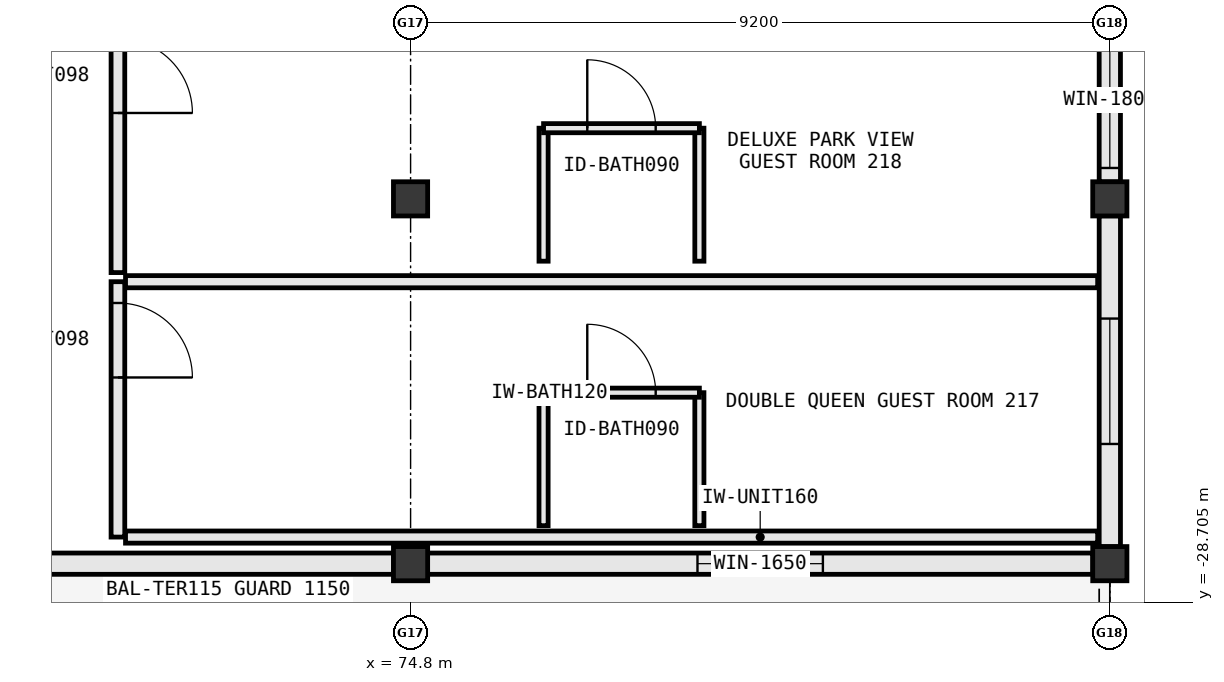
"""IFC4 building model, lengths in metres.
Left out: names, types, materials, properties, quantities, classifications, styles, units other than length and angle.
Written with IfcOpenShell. Run it as: python <this file> out.ifc"""

import sys

from ifc_helpers import new_model, si_unit, direction, frame, frame_2d, origin, origin_2d, place, context, subcontext, project, spatial, rectangle, extrude, element, fill, save


model = new_model("IFC4")
c1 = context("Model", 3, precision=1e-05, world=origin(), true_north=direction((0.0, 1.0)))
c2 = subcontext(c1, "Body", "Model", "MODEL_VIEW")
j1 = project(units=[si_unit("LENGTHUNIT", "METRE"), si_unit("PLANEANGLEUNIT", "RADIAN")], contexts=[c1])
p1 = place(None, origin())
s1 = spatial("IfcSite", under=j1, at=p1, CompositionType="ELEMENT")
p2 = place(p1, origin())
s2 = spatial("IfcBuilding", under=s1, at=p2, CompositionType="ELEMENT")
p3 = place(p2, frame((0.0, 0.0, 31.4)))
s3 = spatial("IfcBuildingStorey", under=s2, at=p3, CompositionType="ELEMENT", Elevation=31.4)
for number, where, z_axis, x_axis in (
    (1, (74.8, -28.2, 0.0), (0.0, 0.0, 1.0), (1.0, 0.0, 0.0)),
    (2, (74.8, -23.4, 0.0), (0.0, 0.0, 1.0), (1.0, 0.0, 0.0)),
    (3, (84.0, -28.2, 0.0), (0.0, 0.0, 1.0), (1.0, 0.0, 0.0)),
    (4, (84.0, -23.4, 0.0), (0.0, 0.0, 1.0), (1.0, 0.0, 0.0)),
):
    element("IfcColumn", number, at=place(p3, frame(where, z_axis=z_axis, x_axis=x_axis)), inside=s3, PredefinedType="COLUMN", context=c2, shape_type="SweptSolid", body=[
        extrude(rectangle(XDim=0.45, YDim=0.45, at=origin_2d()), origin(), (0.0, 0.0, 1.0), 3.8),
    ])
p4 = place(p3, frame((65.6, -28.2, 0.0), z_axis=(0.0, 0.0, 1.0), x_axis=(1.0, 0.0, 0.0)))
e5 = element("IfcWall", 5, at=p4, inside=s3, PredefinedType="STANDARD", context=c2, shape_type="SweptSolid", body=[
    extrude(rectangle(XDim=8.977, YDim=0.28, at=frame_2d((4.488, 0.0))), origin(), (0.0, 0.0, 1.0), 3.555),
])
p5 = place(p4, frame((2.6, 0.0, 0.0)))
e6 = element("IfcOpeningElement", 6, at=p5, cuts=e5, PredefinedType="OPENING", context=c2, shape_type="SweptSolid", body=[
    extrude(rectangle(XDim=1.5, YDim=2.22, at=frame_2d((0.75, 1.11))), frame((0.0, 0.152, 0.0), z_axis=(0.0, -1.0, 0.0), x_axis=(1.0, 0.0, 0.0)), (0.0, 0.0, 1.0), 0.304),
])
p6 = place(p3, frame((75.023, -28.2, 0.0), z_axis=(0.0, 0.0, 1.0), x_axis=(1.0, 0.0, 0.0)))
e7 = element("IfcWall", 7, at=p6, inside=s3, PredefinedType="STANDARD", context=c2, shape_type="SweptSolid", body=[
    extrude(rectangle(XDim=8.754, YDim=0.28, at=frame_2d((4.377, 0.0))), origin(), (0.0, 0.0, 1.0), 2.93),
])
p7 = place(p6, frame((3.552, 0.0, 0.85)))
e8 = element("IfcOpeningElement", 8, at=p7, cuts=e7, PredefinedType="OPENING", context=c2, shape_type="SweptSolid", body=[
    extrude(rectangle(XDim=1.65, YDim=1.8, at=frame_2d((0.825, 0.9))), frame((0.0, 0.152, 0.0), z_axis=(0.0, -1.0, 0.0), x_axis=(1.0, 0.0, 0.0)), (0.0, 0.0, 1.0), 0.304),
])
p8 = place(p3, frame((84.0, -27.977, 0.0), z_axis=(0.0, 0.0, 1.0), x_axis=(0.0, 1.0, 0.0)))
e9 = element("IfcWall", 9, at=p8, inside=s3, PredefinedType="STANDARD", context=c2, shape_type="SweptSolid", body=[
    extrude(rectangle(XDim=4.354, YDim=0.28, at=frame_2d((2.177, 0.0))), origin(), (0.0, 0.0, 1.0), 2.97),
])
p9 = place(p8, frame((1.352, 0.0, 0.85)))
e10 = element("IfcOpeningElement", 10, at=p9, cuts=e9, PredefinedType="OPENING", context=c2, shape_type="SweptSolid", body=[
    extrude(rectangle(XDim=1.65, YDim=1.8, at=frame_2d((0.825, 0.9))), frame((0.0, 0.152, 0.0), z_axis=(0.0, -1.0, 0.0), x_axis=(1.0, 0.0, 0.0)), (0.0, 0.0, 1.0), 0.304),
])
p10 = place(p3, frame((84.0, -23.177, 0.0), z_axis=(0.0, 0.0, 1.0), x_axis=(0.0, 1.0, 0.0)))
e11 = element("IfcWall", 11, at=p10, inside=s3, PredefinedType="STANDARD", context=c2, shape_type="SweptSolid", body=[
    extrude(rectangle(XDim=4.354, YDim=0.28, at=frame_2d((2.177, 0.0))), origin(), (0.0, 0.0, 1.0), 2.97),
])
p11 = place(p10, frame((0.184, 0.0, 0.85)))
e12 = element("IfcOpeningElement", 12, at=p11, cuts=e11, PredefinedType="OPENING", context=c2, shape_type="SweptSolid", body=[
    extrude(rectangle(XDim=1.8, YDim=1.85, at=frame_2d((0.9, 0.925))), frame((0.0, 0.152, 0.0), z_axis=(0.0, -1.0, 0.0), x_axis=(1.0, 0.0, 0.0)), (0.0, 0.0, 1.0), 0.304),
])
p12 = place(p10, frame((2.496, 0.0, 0.85)))
e13 = element("IfcOpeningElement", 13, at=p12, cuts=e11, PredefinedType="OPENING", context=c2, shape_type="SweptSolid", body=[
    extrude(rectangle(XDim=1.65, YDim=1.8, at=frame_2d((0.825, 0.9))), frame((0.0, 0.152, 0.0), z_axis=(0.0, -1.0, 0.0), x_axis=(1.0, 0.0, 0.0)), (0.0, 0.0, 1.0), 0.304),
])
p13 = place(p3, frame((70.95, -24.49, 0.0), z_axis=(0.0, 0.0, 1.0), x_axis=(0.0, -1.0, 0.0)))
e14 = element("IfcWall", 14, at=p13, inside=s3, PredefinedType="PARTITIONING", context=c2, shape_type="SweptSolid", body=[
    extrude(rectangle(XDim=3.36, YDim=0.18, at=frame_2d((1.68, 0.0))), origin(), (0.0, 0.0, 1.0), 3.555),
])
p14 = place(p13, frame((0.28, 0.0, 0.0)))
e15 = element("IfcOpeningElement", 15, at=p14, cuts=e14, PredefinedType="OPENING", context=c2, shape_type="SweptSolid", body=[
    extrude(rectangle(XDim=0.98, YDim=2.18, at=frame_2d((0.49, 1.09))), frame((0.0, 0.102, 0.0), z_axis=(0.0, -1.0, 0.0), x_axis=(1.0, 0.0, 0.0)), (0.0, 0.0, 1.0), 0.204),
])
p15 = place(p3, frame((71.05, -27.85, 0.0), z_axis=(0.0, 0.0, 1.0), x_axis=(1.0, 0.0, 0.0)))
e16 = element("IfcWall", 16, at=p15, inside=s3, PredefinedType="PARTITIONING", context=c2, shape_type="SweptSolid", body=[
    extrude(rectangle(XDim=12.79, YDim=0.16, at=frame_2d((6.395, 0.0))), origin(), (0.0, 0.0, 1.0), 2.93),
])
p16 = place(p3, frame((71.05, -24.49, 0.0), z_axis=(0.0, 0.0, 1.0), x_axis=(1.0, 0.0, 0.0)))
e17 = element("IfcWall", 17, at=p16, inside=s3, PredefinedType="PARTITIONING", context=c2, shape_type="SweptSolid", body=[
    extrude(rectangle(XDim=12.79, YDim=0.16, at=frame_2d((6.395, 0.0))), origin(), (0.0, 0.0, 1.0), 3.555),
])
for number, where, z_axis, x_axis in (
    (18, (76.55, -27.7, 0.0), (0.0, 0.0, 1.0), (0.0, 1.0, 0.0)),
    (19, (78.6, -27.7, 0.0), (0.0, 0.0, 1.0), (0.0, 1.0, 0.0)),
):
    element("IfcWall", number, at=place(p3, frame(where, z_axis=z_axis, x_axis=x_axis)), inside=s3, PredefinedType="PARTITIONING", context=c2, shape_type="SweptSolid", body=[
        extrude(rectangle(XDim=1.75, YDim=0.12, at=frame_2d((0.875, 0.0))), origin(), (0.0, 0.0, 1.0), 3.555),
    ])
p17 = place(p3, frame((76.55, -25.95, 0.0), z_axis=(0.0, 0.0, 1.0), x_axis=(1.0, 0.0, 0.0)))
e20 = element("IfcWall", 20, at=p17, inside=s3, PredefinedType="PARTITIONING", context=c2, shape_type="SweptSolid", body=[
    extrude(rectangle(XDim=2.05, YDim=0.12, at=frame_2d((1.025, 0.0))), origin(), (0.0, 0.0, 1.0), 3.555),
])
p18 = place(p17, frame((0.575, 0.0, 0.0)))
e21 = element("IfcOpeningElement", 21, at=p18, cuts=e20, PredefinedType="OPENING", context=c2, shape_type="SweptSolid", body=[
    extrude(rectangle(XDim=0.9, YDim=2.15, at=frame_2d((0.45, 1.075))), frame((0.0, 0.072, 0.0), z_axis=(0.0, -1.0, 0.0), x_axis=(1.0, 0.0, 0.0)), (0.0, 0.0, 1.0), 0.144),
])
p19 = place(p3, frame((70.95, -21.01, 0.0), z_axis=(0.0, 0.0, 1.0), x_axis=(0.0, -1.0, 0.0)))
e22 = element("IfcWall", 22, at=p19, inside=s3, PredefinedType="PARTITIONING", context=c2, shape_type="SweptSolid", body=[
    extrude(rectangle(XDim=3.36, YDim=0.18, at=frame_2d((1.68, 0.0))), origin(), (0.0, 0.0, 1.0), 3.555),
])
p20 = place(p19, frame((0.28, 0.0, 0.0)))
e23 = element("IfcOpeningElement", 23, at=p20, cuts=e22, PredefinedType="OPENING", context=c2, shape_type="SweptSolid", body=[
    extrude(rectangle(XDim=0.98, YDim=2.18, at=frame_2d((0.49, 1.09))), frame((0.0, 0.102, 0.0), z_axis=(0.0, -1.0, 0.0), x_axis=(1.0, 0.0, 0.0)), (0.0, 0.0, 1.0), 0.204),
])
for number, where, z_axis, x_axis in (
    (24, (76.55, -24.22, 0.0), (0.0, 0.0, 1.0), (0.0, 1.0, 0.0)),
    (25, (78.6, -24.22, 0.0), (0.0, 0.0, 1.0), (0.0, 1.0, 0.0)),
):
    element("IfcWall", number, at=place(p3, frame(where, z_axis=z_axis, x_axis=x_axis)), inside=s3, PredefinedType="PARTITIONING", context=c2, shape_type="SweptSolid", body=[
        extrude(rectangle(XDim=1.75, YDim=0.12, at=frame_2d((0.875, 0.0))), origin(), (0.0, 0.0, 1.0), 3.555),
    ])
p21 = place(p3, frame((76.55, -22.47, 0.0), z_axis=(0.0, 0.0, 1.0), x_axis=(1.0, 0.0, 0.0)))
e26 = element("IfcWall", 26, at=p21, inside=s3, PredefinedType="PARTITIONING", context=c2, shape_type="SweptSolid", body=[
    extrude(rectangle(XDim=2.05, YDim=0.12, at=frame_2d((1.025, 0.0))), origin(), (0.0, 0.0, 1.0), 3.555),
])
p22 = place(p21, frame((0.575, 0.0, 0.0)))
e27 = element("IfcOpeningElement", 27, at=p22, cuts=e26, PredefinedType="OPENING", context=c2, shape_type="SweptSolid", body=[
    extrude(rectangle(XDim=0.9, YDim=2.15, at=frame_2d((0.45, 1.075))), frame((0.0, 0.072, 0.0), z_axis=(0.0, -1.0, 0.0), x_axis=(1.0, 0.0, 0.0)), (0.0, 0.0, 1.0), 0.144),
])
p23 = place(p7, origin())
e28 = element("IfcWindow", 28, at=p23, inside=s3, PartitioningType="SINGLE_PANEL", PredefinedType="WINDOW", context=c2, shape_type="SweptSolid", body=[
    extrude(rectangle(XDim=1.65, YDim=1.8, at=frame_2d((0.825, 0.9))), frame((0.0, 0.03, 0.0), z_axis=(0.0, -1.0, 0.0), x_axis=(1.0, 0.0, 0.0)), (0.0, 0.0, 1.0), 0.06),
])
fill(e8, e28)
p24 = place(p9, origin())
e29 = element("IfcWindow", 29, at=p24, inside=s3, PartitioningType="SINGLE_PANEL", PredefinedType="WINDOW", context=c2, shape_type="SweptSolid", body=[
    extrude(rectangle(XDim=1.65, YDim=1.8, at=frame_2d((0.825, 0.9))), frame((0.0, 0.03, 0.0), z_axis=(0.0, -1.0, 0.0), x_axis=(1.0, 0.0, 0.0)), (0.0, 0.0, 1.0), 0.06),
])
fill(e10, e29)
p25 = place(p11, origin())
e30 = element("IfcWindow", 30, at=p25, inside=s3, PartitioningType="SINGLE_PANEL", PredefinedType="WINDOW", context=c2, shape_type="SweptSolid", body=[
    extrude(rectangle(XDim=1.8, YDim=1.85, at=frame_2d((0.9, 0.925))), frame((0.0, 0.03, 0.0), z_axis=(0.0, -1.0, 0.0), x_axis=(1.0, 0.0, 0.0)), (0.0, 0.0, 1.0), 0.06),
])
fill(e12, e30)
p26 = place(p14, origin())
e31 = element("IfcDoor", 31, at=p26, inside=s3, OperationType="SINGLE_SWING_RIGHT", PredefinedType="DOOR", context=c2, shape_type="SweptSolid", body=[
    extrude(rectangle(XDim=0.98, YDim=2.18, at=frame_2d((0.49, 1.09))), frame((0.0, 0.025, 0.0), z_axis=(0.0, -1.0, 0.0), x_axis=(1.0, 0.0, 0.0)), (0.0, 0.0, 1.0), 0.05),
])
fill(e15, e31)
p27 = place(p18, origin())
e32 = element("IfcDoor", 32, at=p27, inside=s3, OperationType="SINGLE_SWING_LEFT", PredefinedType="DOOR", context=c2, shape_type="SweptSolid", body=[
    extrude(rectangle(XDim=0.9, YDim=2.15, at=frame_2d((0.45, 1.075))), frame((0.0, 0.025, 0.0), z_axis=(0.0, -1.0, 0.0), x_axis=(1.0, 0.0, 0.0)), (0.0, 0.0, 1.0), 0.05),
])
fill(e21, e32)
p28 = place(p20, origin())
e33 = element("IfcDoor", 33, at=p28, inside=s3, OperationType="SINGLE_SWING_RIGHT", PredefinedType="DOOR", context=c2, shape_type="SweptSolid", body=[
    extrude(rectangle(XDim=0.98, YDim=2.18, at=frame_2d((0.49, 1.09))), frame((0.0, 0.025, 0.0), z_axis=(0.0, -1.0, 0.0), x_axis=(1.0, 0.0, 0.0)), (0.0, 0.0, 1.0), 0.05),
])
fill(e23, e33)
p29 = place(p22, origin())
e34 = element("IfcDoor", 34, at=p29, inside=s3, OperationType="SINGLE_SWING_LEFT", PredefinedType="DOOR", context=c2, shape_type="SweptSolid", body=[
    extrude(rectangle(XDim=0.9, YDim=2.15, at=frame_2d((0.45, 1.075))), frame((0.0, 0.025, 0.0), z_axis=(0.0, -1.0, 0.0), x_axis=(1.0, 0.0, 0.0)), (0.0, 0.0, 1.0), 0.05),
])
fill(e27, e34)
save(model, sys.argv[1])
